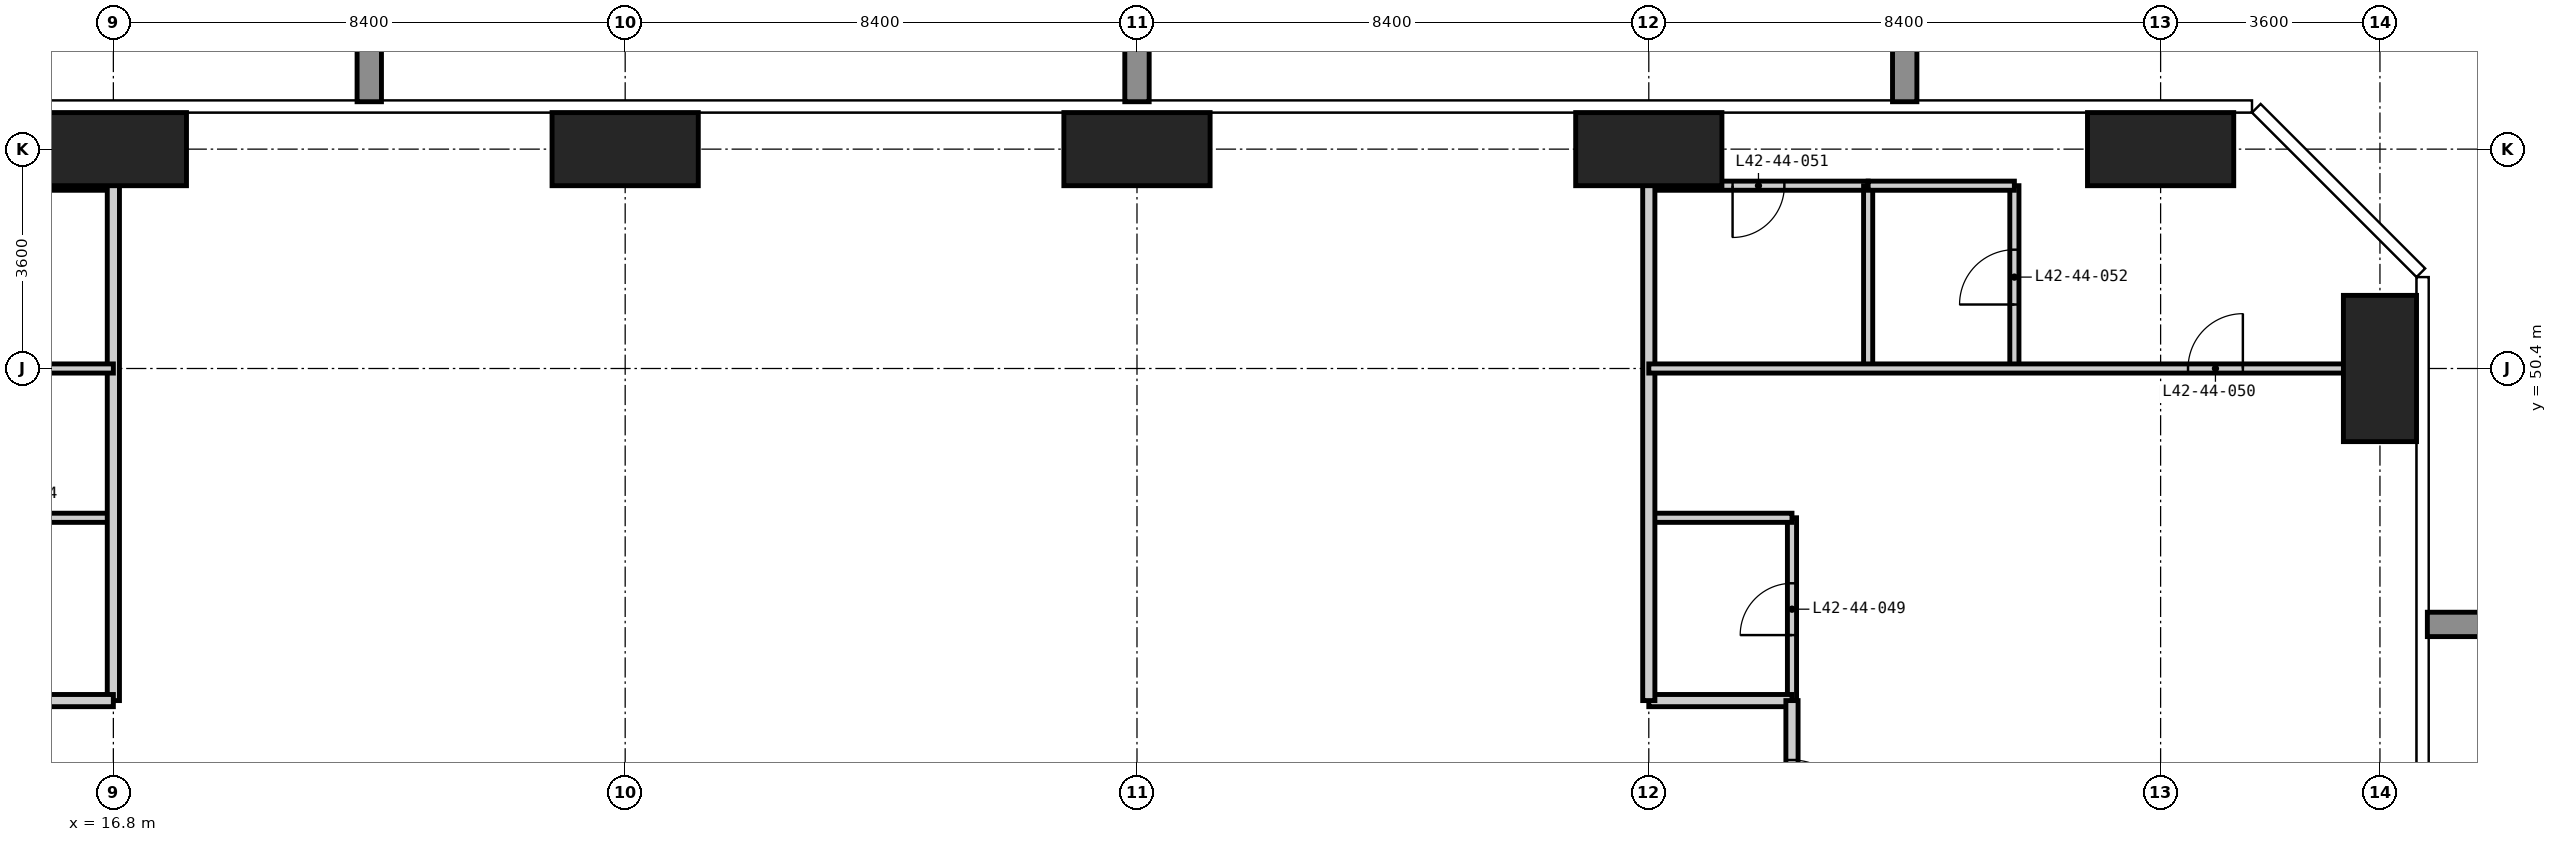
"""IFC4 building model, lengths in metres.
Left out: names, types, materials, properties, quantities, classifications, styles, units other than length and angle.
Written with IfcOpenShell. Run it as: python <this file> out.ifc"""

import sys

from ifc_helpers import new_model, si_unit, direction, frame, frame_2d, origin, origin_2d, place, context, subcontext, project, spatial, rectangle, extrude, element, fill, save


model = new_model("IFC4")
c1 = context("Model", 3, precision=1e-05, world=origin(), true_north=direction((0.0, 1.0)))
c2 = subcontext(c1, "Body", "Model", "MODEL_VIEW")
j1 = project(units=[si_unit("LENGTHUNIT", "METRE"), si_unit("PLANEANGLEUNIT", "RADIAN")], contexts=[c1])
p1 = place(None, origin())
s1 = spatial("IfcSite", under=j1, at=p1, CompositionType="ELEMENT")
p2 = place(p1, origin())
s2 = spatial("IfcBuilding", under=s1, at=p2, CompositionType="ELEMENT")
p3 = place(p2, frame((0.0, 0.0, 166.2)))
s3 = spatial("IfcBuildingStorey", under=s2, at=p3, CompositionType="ELEMENT", Elevation=166.2)
for number, where, z_axis, x_axis in (
    (1, (16.8, 54.0, -0.35), (0.0, 0.0, 1.0), (1.0, 0.0, 0.0)),
    (2, (25.2, 54.0, -0.35), (0.0, 0.0, 1.0), (1.0, 0.0, 0.0)),
    (3, (33.6, 54.0, -0.35), (0.0, 0.0, 1.0), (1.0, 0.0, 0.0)),
    (4, (42.0, 54.0, -0.35), (0.0, 0.0, 1.0), (1.0, 0.0, 0.0)),
    (5, (50.4, 54.0, -0.35), (0.0, 0.0, 1.0), (1.0, 0.0, 0.0)),
):
    element("IfcColumn", number, at=place(p3, frame(where, z_axis=z_axis, x_axis=x_axis)), inside=s3, PredefinedType="COLUMN", context=c2, shape_type="SweptSolid", body=[
        extrude(rectangle(XDim=2.4, YDim=1.2, at=origin_2d()), origin(), (0.0, 0.0, 1.0), 3.6),
    ])
p4 = place(p3, frame((54.0, 50.4, -0.35), z_axis=(0.0, 0.0, 1.0), x_axis=(1.0, 0.0, 0.0)))
e6 = element("IfcColumn", 6, at=p4, inside=s3, PredefinedType="COLUMN", context=c2, shape_type="SweptSolid", body=[
    extrude(rectangle(XDim=1.2, YDim=2.4, at=origin_2d()), origin(), (0.0, 0.0, 1.0), 3.6),
])
p5 = place(p3, frame((44.35, 44.95, 0.0), z_axis=(0.0, 0.0, 1.0), x_axis=(0.0, 1.0, 0.0)))
e7 = element("IfcWall", 7, at=p5, inside=s3, PredefinedType="PARTITIONING", context=c2, shape_type="SweptSolid", body=[
    extrude(rectangle(XDim=3.0, YDim=0.15, at=frame_2d((1.5, 0.0))), origin(), (0.0, 0.0, 1.0), 3.25),
])
p6 = place(p5, frame((1.075, 0.0, 0.0)))
e8 = element("IfcOpeningElement", 8, at=p6, cuts=e7, PredefinedType="OPENING", context=c2, shape_type="SweptSolid", body=[
    extrude(rectangle(XDim=0.85, YDim=2.1, at=frame_2d((0.425, 1.05))), frame((0.0, 0.085, 0.0), z_axis=(0.0, -1.0, 0.0), x_axis=(1.0, 0.0, 0.0)), (0.0, 0.0, 1.0), 0.17),
])
p7 = place(p3, frame((13.25, 47.95, 0.0), z_axis=(0.0, 0.0, 1.0), x_axis=(1.0, 0.0, 0.0)))
e9 = element("IfcWall", 9, at=p7, inside=s3, PredefinedType="PARTITIONING", context=c2, shape_type="SweptSolid", body=[
    extrude(rectangle(XDim=3.55, YDim=0.15, at=frame_2d((1.775, 0.0))), origin(), (0.0, 0.0, 1.0), 3.25),
])
p8 = place(p7, frame((1.35, 0.0, 0.0)))
e10 = element("IfcOpeningElement", 10, at=p8, cuts=e9, PredefinedType="OPENING", context=c2, shape_type="SweptSolid", body=[
    extrude(rectangle(XDim=0.85, YDim=2.1, at=frame_2d((0.425, 1.05))), frame((0.0, 0.085, 0.0), z_axis=(0.0, -1.0, 0.0), x_axis=(1.0, 0.0, 0.0)), (0.0, 0.0, 1.0), 0.17),
])
p9 = place(p3, frame((42.0, 47.95, 0.0), z_axis=(0.0, 0.0, 1.0), x_axis=(1.0, 0.0, 0.0)))
e11 = element("IfcWall", 11, at=p9, inside=s3, PredefinedType="PARTITIONING", context=c2, shape_type="SweptSolid", body=[
    extrude(rectangle(XDim=2.35, YDim=0.15, at=frame_2d((1.175, 0.0))), origin(), (0.0, 0.0, 1.0), 3.25),
])
p10 = place(p3, frame((13.2, 53.4, 0.0), z_axis=(0.0, 0.0, 1.0), x_axis=(1.0, 0.0, 0.0)))
e12 = element("IfcWall", 12, at=p10, inside=s3, PredefinedType="PARTITIONING", context=c2, shape_type="SweptSolid", body=[
    extrude(rectangle(XDim=3.6, YDim=0.15, at=frame_2d((1.8, 0.0))), origin(), (0.0, 0.0, 1.0), 3.25),
])
p11 = place(p10, frame((1.375, 0.0, 0.0)))
e13 = element("IfcOpeningElement", 13, at=p11, cuts=e12, PredefinedType="OPENING", context=c2, shape_type="SweptSolid", body=[
    extrude(rectangle(XDim=0.85, YDim=2.1, at=frame_2d((0.425, 1.05))), frame((0.0, 0.085, 0.0), z_axis=(0.0, -1.0, 0.0), x_axis=(1.0, 0.0, 0.0)), (0.0, 0.0, 1.0), 0.17),
])
p12 = place(p3, frame((42.0, 53.4, 0.0), z_axis=(0.0, 0.0, 1.0), x_axis=(1.0, 0.0, 0.0)))
e14 = element("IfcWall", 14, at=p12, inside=s3, PredefinedType="PARTITIONING", context=c2, shape_type="SweptSolid", body=[
    extrude(rectangle(XDim=3.6, YDim=0.15, at=frame_2d((1.8, 0.0))), origin(), (0.0, 0.0, 1.0), 3.25),
])
p13 = place(p12, frame((1.375, 0.0, 0.0)))
e15 = element("IfcOpeningElement", 15, at=p13, cuts=e14, PredefinedType="OPENING", context=c2, shape_type="SweptSolid", body=[
    extrude(rectangle(XDim=0.85, YDim=2.1, at=frame_2d((0.425, 1.05))), frame((0.0, 0.085, 0.0), z_axis=(0.0, -1.0, 0.0), x_axis=(1.0, 0.0, 0.0)), (0.0, 0.0, 1.0), 0.17),
])
p14 = place(p3, frame((16.8, 44.95, 0.0), z_axis=(0.0, 0.0, 1.0), x_axis=(0.0, 1.0, 0.0)))
e16 = element("IfcWall", 16, at=p14, inside=s3, PredefinedType="PARTITIONING", context=c2, shape_type="SweptSolid", body=[
    extrude(rectangle(XDim=9.668, YDim=0.2, at=frame_2d((4.834, 0.0))), origin(), (0.0, 0.0, 1.0), 3.25),
])
p15 = place(p3, frame((13.25, 44.95, 0.0), z_axis=(0.0, 0.0, 1.0), x_axis=(1.0, 0.0, 0.0)))
e17 = element("IfcWall", 17, at=p15, inside=s3, PredefinedType="PARTITIONING", context=c2, shape_type="SweptSolid", body=[
    extrude(rectangle(XDim=3.55, YDim=0.2, at=frame_2d((1.775, 0.0))), origin(), (0.0, 0.0, 1.0), 3.25),
])
p16 = place(p3, frame((42.0, 44.95, 0.0), z_axis=(0.0, 0.0, 1.0), x_axis=(1.0, 0.0, 0.0)))
e18 = element("IfcWall", 18, at=p16, inside=s3, PredefinedType="PARTITIONING", context=c2, shape_type="SweptSolid", body=[
    extrude(rectangle(XDim=2.35, YDim=0.2, at=frame_2d((1.175, 0.0))), origin(), (0.0, 0.0, 1.0), 3.25),
])
p17 = place(p3, frame((42.0, 54.618, 0.0), z_axis=(0.0, 0.0, 1.0), x_axis=(0.0, -1.0, 0.0)))
e19 = element("IfcWall", 19, at=p17, inside=s3, PredefinedType="PARTITIONING", context=c2, shape_type="SweptSolid", body=[
    extrude(rectangle(XDim=9.668, YDim=0.2, at=frame_2d((4.834, 0.0))), origin(), (0.0, 0.0, 1.0), 3.25),
])
p18 = place(p3, frame((44.35, 44.95, 0.0), z_axis=(0.0, 0.0, 1.0), x_axis=(0.0, -1.0, 0.0)))
e20 = element("IfcWall", 20, at=p18, inside=s3, PredefinedType="PARTITIONING", context=c2, shape_type="SweptSolid", body=[
    extrude(rectangle(XDim=11.35, YDim=0.2, at=frame_2d((5.675, 0.0))), origin(), (0.0, 0.0, 1.0), 3.25),
])
p19 = place(p18, frame((7.55, 0.0, 0.0)))
e21 = element("IfcOpeningElement", 21, at=p19, cuts=e20, PredefinedType="OPENING", context=c2, shape_type="SweptSolid", body=[
    extrude(rectangle(XDim=1.0, YDim=2.2, at=frame_2d((0.5, 1.1))), frame((0.0, 0.11, 0.0), z_axis=(0.0, -1.0, 0.0), x_axis=(1.0, 0.0, 0.0)), (0.0, 0.0, 1.0), 0.22),
])
p20 = place(p18, frame((5.75, 0.0, 0.0)))
e22 = element("IfcOpeningElement", 22, at=p20, cuts=e20, PredefinedType="OPENING", context=c2, shape_type="SweptSolid", body=[
    extrude(rectangle(XDim=1.0, YDim=2.2, at=frame_2d((0.5, 1.1))), frame((0.0, 0.11, 0.0), z_axis=(0.0, -1.0, 0.0), x_axis=(1.0, 0.0, 0.0)), (0.0, 0.0, 1.0), 0.22),
])
p21 = place(p18, frame((0.975, 0.0, 0.0)))
e23 = element("IfcOpeningElement", 23, at=p21, cuts=e20, PredefinedType="OPENING", context=c2, shape_type="SweptSolid", body=[
    extrude(rectangle(XDim=1.0, YDim=2.2, at=frame_2d((0.5, 1.1))), frame((0.0, 0.11, 0.0), z_axis=(0.0, -1.0, 0.0), x_axis=(1.0, 0.0, 0.0)), (0.0, 0.0, 1.0), 0.22),
])
p22 = place(p3, frame((45.6, 50.4, 0.0), z_axis=(0.0, 0.0, 1.0), x_axis=(0.0, 1.0, 0.0)))
e24 = element("IfcWall", 24, at=p22, inside=s3, PredefinedType="PARTITIONING", context=c2, shape_type="SweptSolid", body=[
    extrude(rectangle(XDim=3.0, YDim=0.15, at=frame_2d((1.5, 0.0))), origin(), (0.0, 0.0, 1.0), 3.25),
])
p23 = place(p3, frame((48.0, 50.4, 0.0), z_axis=(0.0, 0.0, 1.0), x_axis=(0.0, 1.0, 0.0)))
e25 = element("IfcWall", 25, at=p23, inside=s3, PredefinedType="PARTITIONING", context=c2, shape_type="SweptSolid", body=[
    extrude(rectangle(XDim=3.0, YDim=0.15, at=frame_2d((1.5, 0.0))), origin(), (0.0, 0.0, 1.0), 3.25),
])
p24 = place(p23, frame((1.05, 0.0, 0.0)))
e26 = element("IfcOpeningElement", 26, at=p24, cuts=e25, PredefinedType="OPENING", context=c2, shape_type="SweptSolid", body=[
    extrude(rectangle(XDim=0.9, YDim=2.1, at=frame_2d((0.45, 1.05))), frame((0.0, 0.085, 0.0), z_axis=(0.0, -1.0, 0.0), x_axis=(1.0, 0.0, 0.0)), (0.0, 0.0, 1.0), 0.17),
])
p25 = place(p3, frame((4.182, 50.4, 0.0), z_axis=(0.0, 0.0, 1.0), x_axis=(1.0, 0.0, 0.0)))
e27 = element("IfcWall", 27, at=p25, inside=s3, PredefinedType="PARTITIONING", context=c2, shape_type="SweptSolid", body=[
    extrude(rectangle(XDim=12.618, YDim=0.15, at=frame_2d((6.309, 0.0))), origin(), (0.0, 0.0, 1.0), 3.25),
])
p26 = place(p25, frame((2.868, 0.0, 0.0)))
e28 = element("IfcOpeningElement", 28, at=p26, cuts=e27, PredefinedType="OPENING", context=c2, shape_type="SweptSolid", body=[
    extrude(rectangle(XDim=0.9, YDim=2.1, at=frame_2d((0.45, 1.05))), frame((0.0, 0.085, 0.0), z_axis=(0.0, -1.0, 0.0), x_axis=(1.0, 0.0, 0.0)), (0.0, 0.0, 1.0), 0.17),
])
p27 = place(p3, frame((42.0, 50.4, 0.0), z_axis=(0.0, 0.0, 1.0), x_axis=(1.0, 0.0, 0.0)))
e29 = element("IfcWall", 29, at=p27, inside=s3, PredefinedType="PARTITIONING", context=c2, shape_type="SweptSolid", body=[
    extrude(rectangle(XDim=12.618, YDim=0.15, at=frame_2d((6.309, 0.0))), origin(), (0.0, 0.0, 1.0), 3.25),
])
p28 = place(p27, frame((8.85, 0.0, 0.0)))
e30 = element("IfcOpeningElement", 30, at=p28, cuts=e29, PredefinedType="OPENING", context=c2, shape_type="SweptSolid", body=[
    extrude(rectangle(XDim=0.9, YDim=2.1, at=frame_2d((0.45, 1.05))), frame((0.0, 0.085, 0.0), z_axis=(0.0, -1.0, 0.0), x_axis=(1.0, 0.0, 0.0)), (0.0, 0.0, 1.0), 0.17),
])
p29 = place(p3, frame((45.6, 53.4, 0.0), z_axis=(0.0, 0.0, 1.0), x_axis=(1.0, 0.0, 0.0)))
e31 = element("IfcWall", 31, at=p29, inside=s3, PredefinedType="PARTITIONING", context=c2, shape_type="SweptSolid", body=[
    extrude(rectangle(XDim=2.4, YDim=0.15, at=frame_2d((1.2, 0.0))), origin(), (0.0, 0.0, 1.0), 3.25),
])
p30 = place(p21, origin())
e32 = element("IfcDoor", 32, at=p30, inside=s3, OperationType="SINGLE_SWING_RIGHT", PredefinedType="DOOR", context=c2, shape_type="SweptSolid", body=[
    extrude(rectangle(XDim=1.0, YDim=2.2, at=frame_2d((0.5, 1.1))), frame((0.0, 0.025, 0.0), z_axis=(0.0, -1.0, 0.0), x_axis=(1.0, 0.0, 0.0)), (0.0, 0.0, 1.0), 0.05),
])
fill(e23, e32)
p31 = place(p6, origin())
e33 = element("IfcDoor", 33, at=p31, inside=s3, OperationType="SINGLE_SWING_LEFT", PredefinedType="DOOR", context=c2, shape_type="SweptSolid", body=[
    extrude(rectangle(XDim=0.85, YDim=2.1, at=frame_2d((0.425, 1.05))), frame((0.0, 0.025, 0.0), z_axis=(0.0, -1.0, 0.0), x_axis=(1.0, 0.0, 0.0)), (0.0, 0.0, 1.0), 0.05),
])
fill(e8, e33)
p32 = place(p28, origin())
e34 = element("IfcDoor", 34, at=p32, inside=s3, OperationType="SINGLE_SWING_RIGHT", PredefinedType="DOOR", context=c2, shape_type="SweptSolid", body=[
    extrude(rectangle(XDim=0.9, YDim=2.1, at=frame_2d((0.45, 1.05))), frame((0.0, 0.025, 0.0), z_axis=(0.0, -1.0, 0.0), x_axis=(1.0, 0.0, 0.0)), (0.0, 0.0, 1.0), 0.05),
])
fill(e30, e34)
p33 = place(p13, frame((0.85, 0.0, 0.0), z_axis=(0.0, 0.0, 1.0), x_axis=(-1.0, 0.0, 0.0)))
e35 = element("IfcDoor", 35, at=p33, inside=s3, OperationType="SINGLE_SWING_RIGHT", PredefinedType="DOOR", context=c2, shape_type="SweptSolid", body=[
    extrude(rectangle(XDim=0.85, YDim=2.1, at=frame_2d((0.425, 1.05))), frame((0.0, 0.025, 0.0), z_axis=(0.0, -1.0, 0.0), x_axis=(1.0, 0.0, 0.0)), (0.0, 0.0, 1.0), 0.05),
])
fill(e15, e35)
p34 = place(p24, origin())
e36 = element("IfcDoor", 36, at=p34, inside=s3, OperationType="SINGLE_SWING_LEFT", PredefinedType="DOOR", context=c2, shape_type="SweptSolid", body=[
    extrude(rectangle(XDim=0.9, YDim=2.1, at=frame_2d((0.45, 1.05))), frame((0.0, 0.025, 0.0), z_axis=(0.0, -1.0, 0.0), x_axis=(1.0, 0.0, 0.0)), (0.0, 0.0, 1.0), 0.05),
])
fill(e26, e36)
save(model, sys.argv[1])
